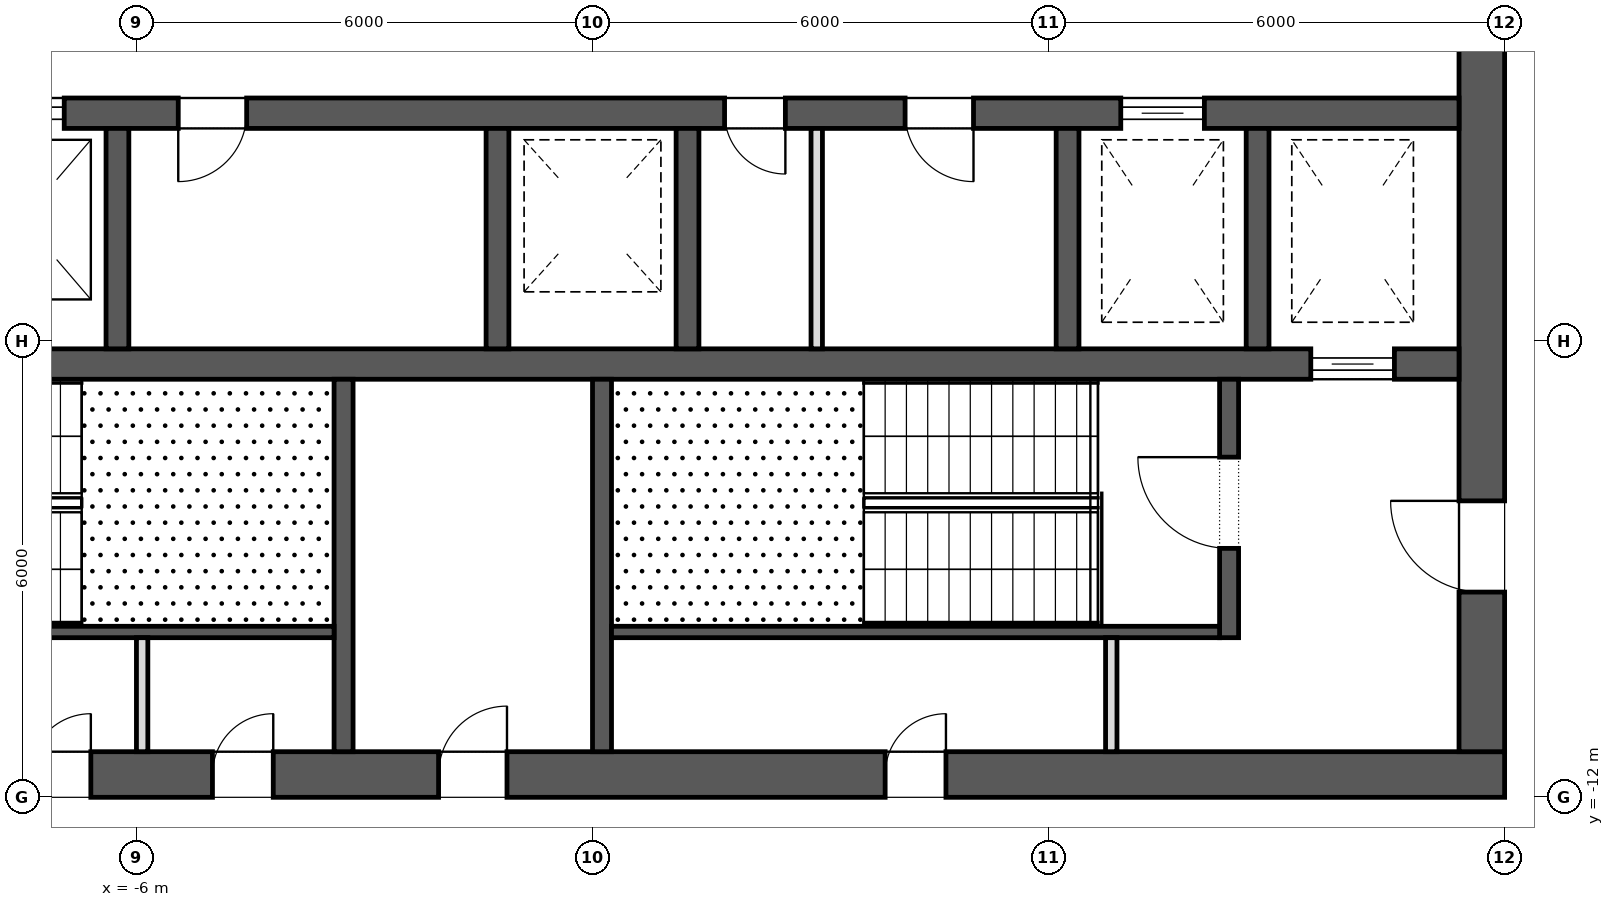
"""IFC4 building model, lengths in metres.
Left out: names, types, materials, properties, quantities, classifications, styles, units other than length and angle.
Written with IfcOpenShell. Run it as: python <this file> out.ifc"""

import sys

from ifc_helpers import new_model, si_unit, direction, frame, frame_2d, origin, place, context, subcontext, project, spatial, rectangle, extrude, element, fill, save


model = new_model("IFC4")
c1 = context("Model", 3, precision=1e-05, world=origin(), true_north=direction((0.0, 1.0)))
c2 = subcontext(c1, "Body", "Model", "MODEL_VIEW")
j1 = project(units=[si_unit("LENGTHUNIT", "METRE"), si_unit("PLANEANGLEUNIT", "RADIAN")], contexts=[c1])
p1 = place(None, origin())
s1 = spatial("IfcSite", under=j1, at=p1, CompositionType="ELEMENT")
p2 = place(p1, origin())
s2 = spatial("IfcBuilding", under=s1, at=p2, CompositionType="ELEMENT")
p3 = place(p2, frame((0.0, 0.0, 300.3)))
s3 = spatial("IfcBuildingStorey", under=s2, at=p3, CompositionType="ELEMENT", Elevation=300.3)
p4 = place(p3, frame((-12.0, -11.7, 0.0), z_axis=(0.0, 0.0, 1.0), x_axis=(1.0, 0.0, 0.0)))
e1 = element("IfcWall", 1, at=p4, inside=s3, PredefinedType="SHEAR", context=c2, shape_type="SweptSolid", body=[
    extrude(rectangle(XDim=24.0, YDim=0.6, at=frame_2d((12.0, 0.0))), origin(), (0.0, 0.0, 1.0), 4.0),
])
p5 = place(p4, frame((9.975, 0.0, 0.0)))
e2 = element("IfcOpeningElement", 2, at=p5, cuts=e1, PredefinedType="OPENING", context=c2, shape_type="SweptSolid", body=[
    extrude(rectangle(XDim=0.9, YDim=2.1, at=frame_2d((0.45, 1.05))), frame((0.0, 0.312, 0.0), z_axis=(0.0, -1.0, 0.0), x_axis=(1.0, 0.0, 0.0)), (0.0, 0.0, 1.0), 0.624),
])
p6 = place(p4, frame((4.6, 0.0, 0.0)))
e3 = element("IfcOpeningElement", 3, at=p6, cuts=e1, PredefinedType="OPENING", context=c2, shape_type="SweptSolid", body=[
    extrude(rectangle(XDim=0.8, YDim=2.1, at=frame_2d((0.4, 1.05))), frame((0.0, 0.312, 0.0), z_axis=(0.0, -1.0, 0.0), x_axis=(1.0, 0.0, 0.0)), (0.0, 0.0, 1.0), 0.624),
])
p7 = place(p4, frame((7.0, 0.0, 0.0)))
e4 = element("IfcOpeningElement", 4, at=p7, cuts=e1, PredefinedType="OPENING", context=c2, shape_type="SweptSolid", body=[
    extrude(rectangle(XDim=0.8, YDim=2.1, at=frame_2d((0.4, 1.05))), frame((0.0, 0.312, 0.0), z_axis=(0.0, -1.0, 0.0), x_axis=(1.0, 0.0, 0.0)), (0.0, 0.0, 1.0), 0.624),
])
p8 = place(p4, frame((15.85, 0.0, 0.0)))
e5 = element("IfcOpeningElement", 5, at=p8, cuts=e1, PredefinedType="OPENING", context=c2, shape_type="SweptSolid", body=[
    extrude(rectangle(XDim=0.8, YDim=2.1, at=frame_2d((0.4, 1.05))), frame((0.0, 0.312, 0.0), z_axis=(0.0, -1.0, 0.0), x_axis=(1.0, 0.0, 0.0)), (0.0, 0.0, 1.0), 0.624),
])
p9 = place(p3, frame((11.7, -11.4, 0.0), z_axis=(0.0, 0.0, 1.0), x_axis=(0.0, 1.0, 0.0)))
e6 = element("IfcWall", 6, at=p9, inside=s3, PredefinedType="SHEAR", context=c2, shape_type="SweptSolid", body=[
    extrude(rectangle(XDim=22.8, YDim=0.6, at=frame_2d((11.4, 0.0))), origin(), (0.0, 0.0, 1.0), 4.0),
])
p10 = place(p9, frame((10.2, 0.0, 0.0)))
e7 = element("IfcOpeningElement", 7, at=p10, cuts=e6, PredefinedType="OPENING", context=c2, shape_type="SweptSolid", body=[
    extrude(rectangle(XDim=2.4, YDim=2.1, at=frame_2d((1.2, 1.05))), frame((0.0, 0.312, 0.0), z_axis=(0.0, -1.0, 0.0), x_axis=(1.0, 0.0, 0.0)), (0.0, 0.0, 1.0), 0.624),
])
p11 = place(p9, frame((19.5, 0.0, 0.0)))
e8 = element("IfcOpeningElement", 8, at=p11, cuts=e6, PredefinedType="OPENING", context=c2, shape_type="SweptSolid", body=[
    extrude(rectangle(XDim=1.2, YDim=2.1, at=frame_2d((0.6, 1.05))), frame((0.0, 0.312, 0.0), z_axis=(0.0, -1.0, 0.0), x_axis=(1.0, 0.0, 0.0)), (0.0, 0.0, 1.0), 0.624),
])
p12 = place(p9, frame((2.1, 0.0, 0.0)))
e9 = element("IfcOpeningElement", 9, at=p12, cuts=e6, PredefinedType="OPENING", context=c2, shape_type="SweptSolid", body=[
    extrude(rectangle(XDim=1.2, YDim=2.1, at=frame_2d((0.6, 1.05))), frame((0.0, 0.312, 0.0), z_axis=(0.0, -1.0, 0.0), x_axis=(1.0, 0.0, 0.0)), (0.0, 0.0, 1.0), 0.624),
])
p13 = place(p3, frame((-11.4, -3.0, 0.0), z_axis=(0.0, 0.0, 1.0), x_axis=(1.0, 0.0, 0.0)))
e10 = element("IfcWall", 10, at=p13, inside=s3, PredefinedType="SHEAR", context=c2, shape_type="SweptSolid", body=[
    extrude(rectangle(XDim=22.8, YDim=0.4, at=frame_2d((11.4, 0.0))), origin(), (0.0, 0.0, 1.0), 4.0),
])
p14 = place(p13, frame((0.85, 0.0, 0.0)))
e11 = element("IfcOpeningElement", 11, at=p14, cuts=e10, PredefinedType="OPENING", context=c2, shape_type="SweptSolid", body=[
    extrude(rectangle(XDim=1.1, YDim=2.1, at=frame_2d((0.55, 1.05))), frame((0.0, 0.212, 0.0), z_axis=(0.0, -1.0, 0.0), x_axis=(1.0, 0.0, 0.0)), (0.0, 0.0, 1.0), 0.424),
])
p15 = place(p13, frame((3.35, 0.0, 0.0)))
e12 = element("IfcOpeningElement", 12, at=p15, cuts=e10, PredefinedType="OPENING", context=c2, shape_type="SweptSolid", body=[
    extrude(rectangle(XDim=1.1, YDim=2.1, at=frame_2d((0.55, 1.05))), frame((0.0, 0.212, 0.0), z_axis=(0.0, -1.0, 0.0), x_axis=(1.0, 0.0, 0.0)), (0.0, 0.0, 1.0), 0.424),
])
p16 = place(p13, frame((18.35, 0.0, 0.0)))
e13 = element("IfcOpeningElement", 13, at=p16, cuts=e10, PredefinedType="OPENING", context=c2, shape_type="SweptSolid", body=[
    extrude(rectangle(XDim=1.1, YDim=2.1, at=frame_2d((0.55, 1.05))), frame((0.0, 0.212, 0.0), z_axis=(0.0, -1.0, 0.0), x_axis=(1.0, 0.0, 0.0)), (0.0, 0.0, 1.0), 0.424),
])
p17 = place(p13, frame((13.137, 0.0, 0.0)))
e14 = element("IfcOpeningElement", 14, at=p17, cuts=e10, PredefinedType="OPENING", context=c2, shape_type="SweptSolid", body=[
    extrude(rectangle(XDim=0.8, YDim=2.1, at=frame_2d((0.4, 1.05))), frame((0.0, 0.212, 0.0), z_axis=(0.0, -1.0, 0.0), x_axis=(1.0, 0.0, 0.0)), (0.0, 0.0, 1.0), 0.424),
])
p18 = place(p13, frame((15.512, 0.0, 0.0)))
e15 = element("IfcOpeningElement", 15, at=p18, cuts=e10, PredefinedType="OPENING", context=c2, shape_type="SweptSolid", body=[
    extrude(rectangle(XDim=0.9, YDim=2.1, at=frame_2d((0.45, 1.05))), frame((0.0, 0.212, 0.0), z_axis=(0.0, -1.0, 0.0), x_axis=(1.0, 0.0, 0.0)), (0.0, 0.0, 1.0), 0.424),
])
p19 = place(p13, frame((5.95, 0.0, 0.0)))
e16 = element("IfcOpeningElement", 16, at=p19, cuts=e10, PredefinedType="OPENING", context=c2, shape_type="SweptSolid", body=[
    extrude(rectangle(XDim=0.9, YDim=2.1, at=frame_2d((0.45, 1.05))), frame((0.0, 0.212, 0.0), z_axis=(0.0, -1.0, 0.0), x_axis=(1.0, 0.0, 0.0)), (0.0, 0.0, 1.0), 0.424),
])
p20 = place(p3, frame((-11.4, -6.3, 0.0), z_axis=(0.0, 0.0, 1.0), x_axis=(1.0, 0.0, 0.0)))
e17 = element("IfcWall", 17, at=p20, inside=s3, PredefinedType="SHEAR", context=c2, shape_type="SweptSolid", body=[
    extrude(rectangle(XDim=22.8, YDim=0.4, at=frame_2d((11.4, 0.0))), origin(), (0.0, 0.0, 1.0), 4.0),
])
p21 = place(p20, frame((20.85, 0.0, 0.0)))
e18 = element("IfcOpeningElement", 18, at=p21, cuts=e17, PredefinedType="OPENING", context=c2, shape_type="SweptSolid", body=[
    extrude(rectangle(XDim=1.1, YDim=2.1, at=frame_2d((0.55, 1.05))), frame((0.0, 0.212, 0.0), z_axis=(0.0, -1.0, 0.0), x_axis=(1.0, 0.0, 0.0)), (0.0, 0.0, 1.0), 0.424),
])
for number, where, z_axis, x_axis in (
    (19, (-6.25, -6.1, 0.0), (0.0, 0.0, 1.0), (0.0, 1.0, 0.0)),
    (20, (-1.25, -6.1, 0.0), (0.0, 0.0, 1.0), (0.0, 1.0, 0.0)),
    (21, (1.25, -6.1, 0.0), (0.0, 0.0, 1.0), (0.0, 1.0, 0.0)),
    (22, (6.25, -6.1, 0.0), (0.0, 0.0, 1.0), (0.0, 1.0, 0.0)),
    (23, (8.75, -6.1, 0.0), (0.0, 0.0, 1.0), (0.0, 1.0, 0.0)),
):
    element("IfcWall", number, at=place(p3, frame(where, z_axis=z_axis, x_axis=x_axis)), inside=s3, PredefinedType="SHEAR", context=c2, shape_type="SweptSolid", body=[
        extrude(rectangle(XDim=2.9, YDim=0.3, at=frame_2d((1.45, 0.0))), origin(), (0.0, 0.0, 1.0), 4.0),
    ])
for number, where, z_axis, x_axis in (
    (24, (-3.275, -11.4, 0.0), (0.0, 0.0, 1.0), (0.0, 1.0, 0.0)),
    (25, (0.125, -11.4, 0.0), (0.0, 0.0, 1.0), (0.0, 1.0, 0.0)),
):
    element("IfcWall", number, at=place(p3, frame(where, z_axis=z_axis, x_axis=x_axis)), inside=s3, PredefinedType="SHEAR", context=c2, shape_type="SweptSolid", body=[
        extrude(rectangle(XDim=4.9, YDim=0.25, at=frame_2d((2.45, 0.0))), origin(), (0.0, 0.0, 1.0), 3.7),
    ])
p22 = place(p3, frame((8.375, -9.9, 0.0), z_axis=(0.0, 0.0, 1.0), x_axis=(0.0, 1.0, 0.0)))
e26 = element("IfcWall", 26, at=p22, inside=s3, PredefinedType="SHEAR", context=c2, shape_type="SweptSolid", body=[
    extrude(rectangle(XDim=3.4, YDim=0.25, at=frame_2d((1.7, 0.0))), origin(), (0.0, 0.0, 1.0), 3.7),
])
p23 = place(p22, frame((1.175, 0.0, 0.0)))
e27 = element("IfcOpeningElement", 27, at=p23, cuts=e26, PredefinedType="OPENING", context=c2, shape_type="SweptSolid", body=[
    extrude(rectangle(XDim=1.2, YDim=2.1, at=frame_2d((0.6, 1.05))), frame((0.0, 0.137, 0.0), z_axis=(0.0, -1.0, 0.0), x_axis=(1.0, 0.0, 0.0)), (0.0, 0.0, 1.0), 0.274),
])
for number, where, z_axis, x_axis in (
    (28, (-11.4, -9.825, 0.0), (0.0, 0.0, 1.0), (1.0, 0.0, 0.0)),
    (29, (0.25, -9.825, 0.0), (0.0, 0.0, 1.0), (1.0, 0.0, 0.0)),
):
    element("IfcWall", number, at=place(p3, frame(where, z_axis=z_axis, x_axis=x_axis)), inside=s3, PredefinedType="SHEAR", context=c2, shape_type="SweptSolid", body=[
        extrude(rectangle(XDim=8.0, YDim=0.15, at=frame_2d((4.0, 0.0))), origin(), (0.0, 0.0, 1.0), 3.7),
    ])
for number, where, z_axis, x_axis in (
    (30, (-5.925, -11.4, 0.0), (0.0, 0.0, 1.0), (0.0, 1.0, 0.0)),
    (31, (6.825, -11.4, 0.0), (0.0, 0.0, 1.0), (0.0, 1.0, 0.0)),
):
    element("IfcWall", number, at=place(p3, frame(where, z_axis=z_axis, x_axis=x_axis)), inside=s3, PredefinedType="PARTITIONING", context=c2, shape_type="SweptSolid", body=[
        extrude(rectangle(XDim=1.5, YDim=0.15, at=frame_2d((0.75, 0.0))), origin(), (0.0, 0.0, 1.0), 3.7),
    ])
p24 = place(p3, frame((2.95, -6.1, 0.0), z_axis=(0.0, 0.0, 1.0), x_axis=(0.0, 1.0, 0.0)))
e32 = element("IfcWall", 32, at=p24, inside=s3, PredefinedType="PARTITIONING", context=c2, shape_type="SweptSolid", body=[
    extrude(rectangle(XDim=2.9, YDim=0.15, at=frame_2d((1.45, 0.0))), origin(), (0.0, 0.0, 1.0), 3.7),
])
p25 = place(p21, origin())
e33 = element("IfcDoor", 33, at=p25, inside=s3, OperationType="SLIDING_TO_LEFT", PredefinedType="DOOR", context=c2, shape_type="SweptSolid", body=[
    extrude(rectangle(XDim=1.1, YDim=2.1, at=frame_2d((0.55, 1.05))), frame((0.0, 0.025, 0.0), z_axis=(0.0, -1.0, 0.0), x_axis=(1.0, 0.0, 0.0)), (0.0, 0.0, 1.0), 0.05),
])
fill(e18, e33)
p26 = place(p15, origin())
e34 = element("IfcDoor", 34, at=p26, inside=s3, OperationType="SLIDING_TO_LEFT", PredefinedType="DOOR", context=c2, shape_type="SweptSolid", body=[
    extrude(rectangle(XDim=1.1, YDim=2.1, at=frame_2d((0.55, 1.05))), frame((0.0, 0.025, 0.0), z_axis=(0.0, -1.0, 0.0), x_axis=(1.0, 0.0, 0.0)), (0.0, 0.0, 1.0), 0.05),
])
fill(e12, e34)
p27 = place(p16, origin())
e35 = element("IfcDoor", 35, at=p27, inside=s3, OperationType="SLIDING_TO_LEFT", PredefinedType="DOOR", context=c2, shape_type="SweptSolid", body=[
    extrude(rectangle(XDim=1.1, YDim=2.1, at=frame_2d((0.55, 1.05))), frame((0.0, 0.025, 0.0), z_axis=(0.0, -1.0, 0.0), x_axis=(1.0, 0.0, 0.0)), (0.0, 0.0, 1.0), 0.05),
])
fill(e13, e35)
p28 = place(p23, origin())
e36 = element("IfcDoor", 36, at=p28, inside=s3, OperationType="SINGLE_SWING_LEFT", PredefinedType="DOOR", context=c2, shape_type="SweptSolid", body=[
    extrude(rectangle(XDim=1.2, YDim=2.1, at=frame_2d((0.6, 1.05))), frame((0.0, 0.025, 0.0), z_axis=(0.0, -1.0, 0.0), x_axis=(1.0, 0.0, 0.0)), (0.0, 0.0, 1.0), 0.05),
])
fill(e27, e36)
p29 = place(p12, origin())
e37 = element("IfcDoor", 37, at=p29, inside=s3, OperationType="SINGLE_SWING_LEFT", PredefinedType="DOOR", context=c2, shape_type="SweptSolid", body=[
    extrude(rectangle(XDim=1.2, YDim=2.1, at=frame_2d((0.6, 1.05))), frame((0.0, 0.025, 0.0), z_axis=(0.0, -1.0, 0.0), x_axis=(1.0, 0.0, 0.0)), (0.0, 0.0, 1.0), 0.05),
])
fill(e9, e37)
p30 = place(p5, origin())
e38 = element("IfcDoor", 38, at=p30, inside=s3, OperationType="SINGLE_SWING_LEFT", PredefinedType="DOOR", context=c2, shape_type="SweptSolid", body=[
    extrude(rectangle(XDim=0.9, YDim=2.1, at=frame_2d((0.45, 1.05))), frame((0.0, 0.025, 0.0), z_axis=(0.0, -1.0, 0.0), x_axis=(1.0, 0.0, 0.0)), (0.0, 0.0, 1.0), 0.05),
])
fill(e2, e38)
p31 = place(p6, origin())
e39 = element("IfcDoor", 39, at=p31, inside=s3, OperationType="SINGLE_SWING_LEFT", PredefinedType="DOOR", context=c2, shape_type="SweptSolid", body=[
    extrude(rectangle(XDim=0.8, YDim=2.1, at=frame_2d((0.4, 1.05))), frame((0.0, 0.025, 0.0), z_axis=(0.0, -1.0, 0.0), x_axis=(1.0, 0.0, 0.0)), (0.0, 0.0, 1.0), 0.05),
])
fill(e3, e39)
p32 = place(p7, origin())
e40 = element("IfcDoor", 40, at=p32, inside=s3, OperationType="SINGLE_SWING_LEFT", PredefinedType="DOOR", context=c2, shape_type="SweptSolid", body=[
    extrude(rectangle(XDim=0.8, YDim=2.1, at=frame_2d((0.4, 1.05))), frame((0.0, 0.025, 0.0), z_axis=(0.0, -1.0, 0.0), x_axis=(1.0, 0.0, 0.0)), (0.0, 0.0, 1.0), 0.05),
])
fill(e4, e40)
p33 = place(p8, origin())
e41 = element("IfcDoor", 41, at=p33, inside=s3, OperationType="SINGLE_SWING_LEFT", PredefinedType="DOOR", context=c2, shape_type="SweptSolid", body=[
    extrude(rectangle(XDim=0.8, YDim=2.1, at=frame_2d((0.4, 1.05))), frame((0.0, 0.025, 0.0), z_axis=(0.0, -1.0, 0.0), x_axis=(1.0, 0.0, 0.0)), (0.0, 0.0, 1.0), 0.05),
])
fill(e5, e41)
p34 = place(p17, frame((0.8, 0.0, 0.0), z_axis=(0.0, 0.0, 1.0), x_axis=(-1.0, 0.0, 0.0)))
e42 = element("IfcDoor", 42, at=p34, inside=s3, OperationType="SINGLE_SWING_RIGHT", PredefinedType="DOOR", context=c2, shape_type="SweptSolid", body=[
    extrude(rectangle(XDim=0.8, YDim=2.1, at=frame_2d((0.4, 1.05))), frame((0.0, 0.025, 0.0), z_axis=(0.0, -1.0, 0.0), x_axis=(1.0, 0.0, 0.0)), (0.0, 0.0, 1.0), 0.05),
])
fill(e14, e42)
p35 = place(p18, frame((0.9, 0.0, 0.0), z_axis=(0.0, 0.0, 1.0), x_axis=(-1.0, 0.0, 0.0)))
e43 = element("IfcDoor", 43, at=p35, inside=s3, OperationType="SINGLE_SWING_RIGHT", PredefinedType="DOOR", context=c2, shape_type="SweptSolid", body=[
    extrude(rectangle(XDim=0.9, YDim=2.1, at=frame_2d((0.45, 1.05))), frame((0.0, 0.025, 0.0), z_axis=(0.0, -1.0, 0.0), x_axis=(1.0, 0.0, 0.0)), (0.0, 0.0, 1.0), 0.05),
])
fill(e15, e43)
p36 = place(p19, frame((0.9, 0.0, 0.0), z_axis=(0.0, 0.0, 1.0), x_axis=(-1.0, 0.0, 0.0)))
e44 = element("IfcDoor", 44, at=p36, inside=s3, OperationType="SINGLE_SWING_LEFT", PredefinedType="DOOR", context=c2, shape_type="SweptSolid", body=[
    extrude(rectangle(XDim=0.9, YDim=2.1, at=frame_2d((0.45, 1.05))), frame((0.0, 0.025, 0.0), z_axis=(0.0, -1.0, 0.0), x_axis=(1.0, 0.0, 0.0)), (0.0, 0.0, 1.0), 0.05),
])
fill(e16, e44)
save(model, sys.argv[1])
